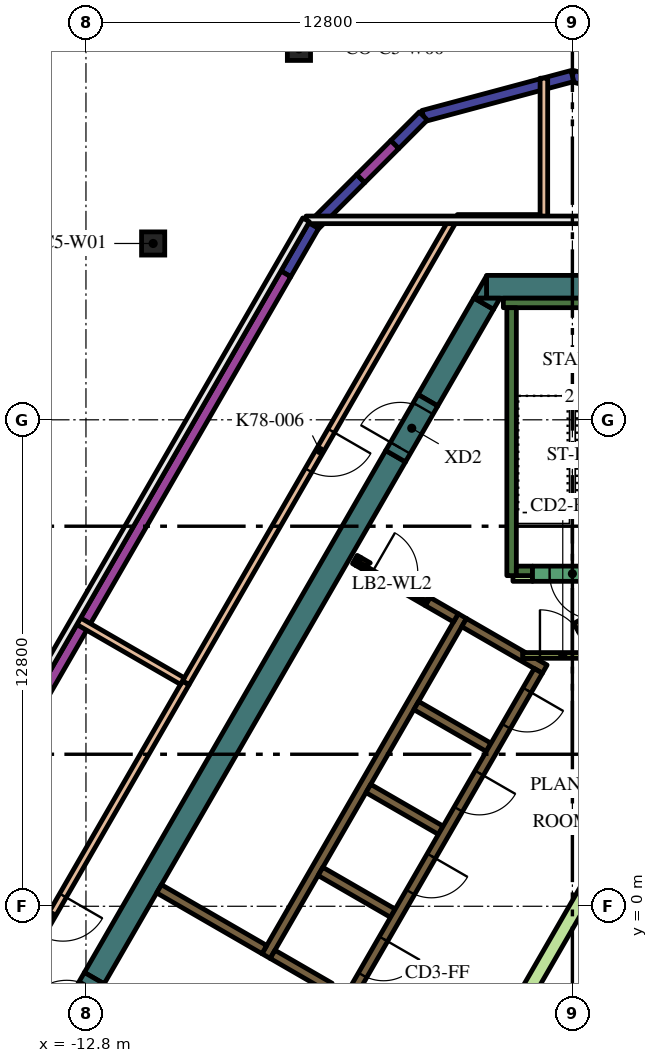
"""IFC4 building model, lengths in metres.
Left out: names, types, materials, properties, quantities, classifications, styles, units other than length and angle.
Written with IfcOpenShell. Run it as: python <this file> out.ifc"""

import sys

from ifc_helpers import new_model, si_unit, direction, frame, frame_2d, origin, origin_2d, place, context, subcontext, project, spatial, polyline, rectangle, hollow_circle, outline, extrude, element, fill, save


model = new_model("IFC4")
c1 = context("Model", 3, precision=1e-05, world=origin(), true_north=direction((0.0, 1.0)))
c2 = subcontext(c1, "Body", "Model", "MODEL_VIEW")
j1 = project(units=[si_unit("LENGTHUNIT", "METRE"), si_unit("PLANEANGLEUNIT", "RADIAN")], contexts=[c1])
p1 = place(None, origin())
s1 = spatial("IfcSite", under=j1, at=p1, CompositionType="ELEMENT")
p2 = place(p1, origin())
s2 = spatial("IfcBuilding", under=s1, at=p2, CompositionType="ELEMENT")
p3 = place(p2, frame((0.0, 0.0, 336.0)))
s3 = spatial("IfcBuildingStorey", under=s2, at=p3, CompositionType="ELEMENT", Elevation=336.0)
for number, where, z_axis, x_axis in (
    (1, (-7.195, 22.561, 0.0), (0.0, 0.0, 1.0), (1.0, 0.0, 0.0)),
    (2, (-11.032, 17.44, 0.0), (0.0, 0.0, 1.0), (1.0, 0.0, 0.0)),
):
    element("IfcColumn", number, at=place(p3, frame(where, z_axis=z_axis, x_axis=x_axis)), inside=s3, PredefinedType="COLUMN", context=c2, shape_type="SweptSolid", body=[
        extrude(hollow_circle(Radius=0.305, WallThickness=0.025, at=origin_2d()), origin(), (0.0, 0.0, 1.0), 4.2),
    ])
p4 = place(p3, frame((-2.258, 16.3, 0.0), z_axis=(0.0, 0.0, 1.0), x_axis=(1.0, 0.0, 0.0)))
e3 = element("IfcWall", 3, at=p4, inside=s3, PredefinedType="SOLIDWALL", context=c2, shape_type="SweptSolid", body=[
    extrude(rectangle(XDim=3.823, YDim=0.6, at=frame_2d((1.912, 0.0))), origin(), (0.0, 0.0, 1.0), 4.2),
])
p5 = place(p3, origin())
e4 = element("IfcWall", 4, at=p5, inside=s3, PredefinedType="SOLIDWALL", context=c2, shape_type="SweptSolid", body=[
    extrude(outline(polyline([(-2.598, 16.0), (-2.26, 16.585), (-2.26, 16.0), (-2.598, 16.0)])), origin(), (0.0, 0.0, 1.0), 4.2),
])
p6 = place(p3, frame((-2.335, 15.855, 0.0), z_axis=(0.0, 0.0, 1.0), x_axis=(-0.499960127962, -0.866048422692, 0.0)))
e5 = element("IfcWall", 5, at=p6, inside=s3, PredefinedType="SOLIDWALL", context=c2, shape_type="SweptSolid", body=[
    extrude(rectangle(XDim=2.934, YDim=0.6, at=frame_2d((1.467, 0.0))), origin(), (0.0, 0.0, 1.0), 4.2),
])
e6 = element("IfcWall", 6, at=p5, inside=s3, PredefinedType="SOLIDWALL", context=c2, shape_type="SweptSolid", body=[
    extrude(outline(polyline([(-1.905, 16.0), (-2.074, 15.707), (-2.581, 16.0), (-1.905, 16.0)])), origin(), (0.0, 0.0, 1.0), 4.2),
])
p7 = place(p3, frame((-4.652, 11.842, 0.0), z_axis=(0.0, 0.0, 1.0), x_axis=(-0.500003640647, -0.866023301845, 0.0)))
e7 = element("IfcWall", 7, at=p7, inside=s3, PredefinedType="SOLIDWALL", context=c2, shape_type="SweptSolid", body=[
    extrude(rectangle(XDim=15.858, YDim=0.6, at=frame_2d((7.929, 0.0))), origin(), (0.0, 0.0, 1.0), 4.2),
])
p8 = place(p3, frame((-1.817, 15.875, 0.0), z_axis=(0.0, 0.0, 1.0), x_axis=(1.0, 0.0, 0.0)))
e8 = element("IfcWall", 8, at=p8, inside=s3, PredefinedType="SOLIDWALL", context=c2, shape_type="SweptSolid", body=[
    extrude(rectangle(XDim=3.634, YDim=0.25, at=frame_2d((1.817, 0.0))), origin(), (0.0, 0.0, 1.0), 4.2),
])
p9 = place(p3, frame((-1.6, 8.7, 0.0), z_axis=(0.0, 0.0, 1.0), x_axis=(0.0, 1.0, 0.0)))
e9 = element("IfcWall", 9, at=p9, inside=s3, PredefinedType="SOLIDWALL", context=c2, shape_type="SweptSolid", body=[
    extrude(rectangle(XDim=7.05, YDim=0.25, at=frame_2d((3.525, 0.0))), origin(), (0.0, 0.0, 1.0), 4.2),
])
p10 = place(p3, frame((-1.475, 8.825, 0.0), z_axis=(0.0, 0.0, 1.0), x_axis=(1.0, 0.0, 0.0)))
e10 = element("IfcWall", 10, at=p10, inside=s3, PredefinedType="SOLIDWALL", context=c2, shape_type="SweptSolid", body=[
    extrude(rectangle(XDim=0.425, YDim=0.25, at=frame_2d((0.212, 0.0))), origin(), (0.0, 0.0, 1.0), 4.2),
])
p11 = place(p3, frame((3.647, 9.38, 0.0), z_axis=(0.0, 0.0, 1.0), x_axis=(-0.866027868628, -0.499995730742, 0.0)))
e11 = element("IfcWall", 11, at=p11, inside=s3, PredefinedType="SOLIDWALL", context=c2, shape_type="SweptSolid", body=[
    extrude(rectangle(XDim=4.099, YDim=0.25, at=frame_2d((2.049, 0.0))), origin(), (0.0, 0.0, 1.0), 4.2),
])
p12 = place(p3, frame((-8.06, -1.311, 0.0), z_axis=(0.0, 0.0, 1.0), x_axis=(0.50000273126, 0.866023826885, 0.0)))
e12 = element("IfcWall", 12, at=p12, inside=s3, PredefinedType="SOLIDWALL", context=c2, shape_type="SweptSolid", body=[
    extrude(rectangle(XDim=10.33, YDim=0.25, at=frame_2d((5.165, 0.0))), origin(), (0.0, 0.0, 1.0), 4.2),
])
e13 = element("IfcWall", 13, at=p5, inside=s3, PredefinedType="SOLIDWALL", context=c2, shape_type="SweptSolid", body=[
    extrude(outline(polyline([(-2.912, 7.356), (-2.787, 7.573), (-1.232, 6.675), (-1.303, 6.675), (-1.304, 6.675), (-1.304, 6.675), (-1.304, 6.525), (-1.304, 6.525), (-1.303, 6.525), (-0.971, 6.525), (-0.665, 6.348), (-0.79, 6.132), (-1.007, 6.257), (-1.007, 6.257), (-2.912, 7.356)])), origin(), (0.0, 0.0, 1.0), 4.2),
])
for number, where, z_axis, x_axis in (
    (14, (-2.204, 4.182, 0.0), (0.0, 0.0, 1.0), (-0.866, 0.5, 0.0)),
    (15, (-5.369, 3.1, 0.0), (0.0, 0.0, 1.0), (0.866, -0.5, 0.0)),
    (16, (-4.724, -0.182, 0.0), (0.0, 0.0, 1.0), (-0.866, 0.5, 0.0)),
):
    element("IfcWall", number, at=place(p3, frame(where, z_axis=z_axis, x_axis=x_axis)), inside=s3, PredefinedType="SOLIDWALL", context=c2, shape_type="SweptSolid", body=[
        extrude(rectangle(XDim=2.2, YDim=0.25, at=frame_2d((1.1, 0.0))), origin(), (0.0, 0.0, 1.0), 4.2),
    ])
p13 = place(p3, frame((-7.889, -1.265, 0.0), z_axis=(0.0, 0.0, 1.0), x_axis=(0.865986741702, -0.500066958712, 0.0)))
e17 = element("IfcWall", 17, at=p13, inside=s3, PredefinedType="SOLIDWALL", context=c2, shape_type="SweptSolid", body=[
    extrude(rectangle(XDim=1.738, YDim=0.25, at=frame_2d((0.869, 0.0))), origin(), (0.0, 0.0, 1.0), 4.2),
])
p14 = place(p3, frame((-8.106, -1.14, 0.0), z_axis=(0.0, 0.0, 1.0), x_axis=(-0.866008981251, 0.500028443584, 0.0)))
e18 = element("IfcWall", 18, at=p14, inside=s3, PredefinedType="SOLIDWALL", context=c2, shape_type="SweptSolid", body=[
    extrude(rectangle(XDim=3.2, YDim=0.25, at=frame_2d((1.6, 0.0))), origin(), (0.0, 0.0, 1.0), 4.2),
])
p15 = place(p3, frame((-5.725, 9.125, 0.0), z_axis=(0.0, 0.0, 1.0), x_axis=(0.866185586049, -0.49972245349, 0.0)))
e19 = element("IfcWall", 19, at=p15, inside=s3, PredefinedType="SOLIDWALL", context=c2, shape_type="SweptSolid", body=[
    extrude(rectangle(XDim=0.11, YDim=0.25, at=frame_2d((0.055, 0.0))), origin(), (0.0, 0.0, 1.0), 4.2),
])
p16 = place(p3, frame((-3.066, 7.59, 0.0), z_axis=(0.0, 0.0, 1.0), x_axis=(-0.866081358704, 0.49990307071, 0.0)))
e20 = element("IfcWall", 20, at=p16, inside=s3, PredefinedType="SOLIDWALL", context=c2, shape_type="SweptSolid", body=[
    extrude(rectangle(XDim=0.858, YDim=0.25, at=frame_2d((0.429, 0.0))), origin(), (0.0, 0.0, 1.0), 4.2),
])
e21 = element("IfcWall", 21, at=p5, inside=s3, PredefinedType="SOLIDWALL", context=c2, shape_type="SweptSolid", body=[
    extrude(outline(polyline([(-3.748, 8.128), (-3.813, 8.015), (-4.027, 8.139), (-4.017, 8.156), (-4.008, 8.173), (-4.0, 8.192), (-3.995, 8.21), (-3.991, 8.23), (-3.99, 8.25), (-3.99, 8.268), (-3.748, 8.128)])), origin(), (0.0, 0.0, 1.0), 4.2),
])
e22 = element("IfcWall", 22, at=p5, inside=s3, PredefinedType="SOLIDWALL", context=c2, shape_type="SweptSolid", body=[
    extrude(outline(polyline([(-5.689, 8.96), (-5.69, 8.961), (-5.565, 9.177), (-5.319, 9.035), (-5.335, 9.026), (-5.351, 9.015), (-5.366, 9.002), (-5.379, 8.988), (-5.392, 8.972), (-5.402, 8.956), (-5.412, 8.939), (-5.629, 9.064), (-5.629, 9.064), (-5.689, 8.96)])), origin(), (0.0, 0.0, 1.0), 4.2),
])
p17 = place(p3, frame((-1.564, 8.625, 0.0), z_axis=(0.0, 0.0, 1.0), x_axis=(1.0, 0.0, 0.0)))
e23 = element("IfcWall", 23, at=p17, inside=s3, PredefinedType="PARTITIONING", context=c2, shape_type="SweptSolid", body=[
    extrude(rectangle(XDim=0.514, YDim=0.15, at=frame_2d((0.257, 0.0))), origin(), (0.0, 0.0, 1.0), 3.45),
])
e24 = element("IfcWall", 24, at=p5, inside=s3, PredefinedType="PARTITIONING", context=c2, shape_type="SweptSolid", body=[
    extrude(outline(polyline([(2.017, 3.643), (2.342, 3.456), (-1.822, -3.756), (-2.147, -3.568), (2.017, 3.643)])), origin(), (0.0, 0.0, 1.0), 3.45),
])
p18 = place(p3, frame((-0.898, 6.194, 0.0), z_axis=(0.0, 0.0, 1.0), x_axis=(-0.499996202215, -0.866027596426, 0.0)))
e25 = element("IfcWall", 25, at=p18, inside=s3, PredefinedType="SOLIDWALL", context=c2, shape_type="SweptSolid", body=[
    extrude(rectangle(XDim=9.83, YDim=0.25, at=frame_2d((4.915, 0.0))), origin(), (0.0, 0.0, 1.0), 4.2),
])
p19 = place(p18, frame((0.585, 0.0, 0.0)))
e26 = element("IfcOpeningElement", 26, at=p19, cuts=e25, PredefinedType="OPENING", context=c2, shape_type="SweptSolid", body=[
    extrude(rectangle(XDim=1.1, YDim=2.1, at=frame_2d((0.55, 1.05))), frame((0.0, 0.135, 0.0), z_axis=(0.0, -1.0, 0.0), x_axis=(1.0, 0.0, 0.0)), (0.0, 0.0, 1.0), 0.27),
])
p20 = place(p18, frame((3.105, 0.0, 0.0)))
e27 = element("IfcOpeningElement", 27, at=p20, cuts=e25, PredefinedType="OPENING", context=c2, shape_type="SweptSolid", body=[
    extrude(rectangle(XDim=1.1, YDim=2.1, at=frame_2d((0.55, 1.05))), frame((0.0, 0.135, 0.0), z_axis=(0.0, -1.0, 0.0), x_axis=(1.0, 0.0, 0.0)), (0.0, 0.0, 1.0), 0.27),
])
p21 = place(p18, frame((5.625, 0.0, 0.0)))
e28 = element("IfcOpeningElement", 28, at=p21, cuts=e25, PredefinedType="OPENING", context=c2, shape_type="SweptSolid", body=[
    extrude(rectangle(XDim=1.1, YDim=2.1, at=frame_2d((0.55, 1.05))), frame((0.0, 0.135, 0.0), z_axis=(0.0, -1.0, 0.0), x_axis=(1.0, 0.0, 0.0)), (0.0, 0.0, 1.0), 0.27),
])
p22 = place(p18, frame((8.145, 0.0, 0.0)))
e29 = element("IfcOpeningElement", 29, at=p22, cuts=e25, PredefinedType="OPENING", context=c2, shape_type="SweptSolid", body=[
    extrude(rectangle(XDim=1.1, YDim=2.1, at=frame_2d((0.55, 1.05))), frame((0.0, 0.135, 0.0), z_axis=(0.0, -1.0, 0.0), x_axis=(1.0, 0.0, 0.0)), (0.0, 0.0, 1.0), 0.27),
])
p23 = place(p3, frame((1.05, 8.75, 0.0), z_axis=(0.0, 0.0, 1.0), x_axis=(-1.0, 0.0, 0.0)))
e30 = element("IfcWall", 30, at=p23, inside=s3, PredefinedType="SOLIDWALL", context=c2, shape_type="SweptSolid", body=[
    extrude(rectangle(XDim=2.1, YDim=0.4, at=frame_2d((1.05, 0.0))), origin(), (0.0, 0.0, 1.0), 4.2),
])
p24 = place(p23, frame((0.45, 0.0, 0.0)))
e31 = element("IfcOpeningElement", 31, at=p24, cuts=e30, PredefinedType="OPENING", context=c2, shape_type="SweptSolid", body=[
    extrude(rectangle(XDim=1.2, YDim=2.1, at=frame_2d((0.6, 1.05))), frame((0.0, 0.21, 0.0), z_axis=(0.0, -1.0, 0.0), x_axis=(1.0, 0.0, 0.0)), (0.0, 0.0, 1.0), 0.42),
])
p25 = place(p3, frame((-1.303, 6.6, 0.0), z_axis=(0.0, 0.0, 1.0), x_axis=(1.0, 0.0, 0.0)))
e32 = element("IfcWall", 32, at=p25, inside=s3, PredefinedType="PARTITIONING", context=c2, shape_type="SweptSolid", body=[
    extrude(rectangle(XDim=2.1, YDim=0.15, at=frame_2d((1.05, 0.0))), origin(), (0.0, 0.0, 1.0), 4.2),
])
p26 = place(p25, frame((0.45, 0.0, 0.0)))
e33 = element("IfcOpeningElement", 33, at=p26, cuts=e32, PredefinedType="OPENING", context=c2, shape_type="SweptSolid", body=[
    extrude(rectangle(XDim=1.2, YDim=2.1, at=frame_2d((0.6, 1.05))), frame((0.0, 0.085, 0.0), z_axis=(0.0, -1.0, 0.0), x_axis=(1.0, 0.0, 0.0)), (0.0, 0.0, 1.0), 0.17),
])
p27 = place(p3, frame((-5.659, 9.012, 0.0), z_axis=(0.0, 0.0, 1.0), x_axis=(0.866009402589, -0.500027713859, 0.0)))
e34 = element("IfcWall", 34, at=p27, inside=s3, PredefinedType="PARTITIONING", context=c2, shape_type="SweptSolid", body=[
    extrude(rectangle(XDim=2.1, YDim=0.12, at=frame_2d((1.05, 0.0))), origin(), (0.0, 0.0, 1.0), 3.45),
])
p28 = place(p27, frame((0.45, 0.0, 0.0)))
e35 = element("IfcOpeningElement", 35, at=p28, cuts=e34, PredefinedType="OPENING", context=c2, shape_type="SweptSolid", body=[
    extrude(rectangle(XDim=1.2, YDim=2.1, at=frame_2d((0.6, 1.05))), frame((0.0, 0.07, 0.0), z_axis=(0.0, -1.0, 0.0), x_axis=(1.0, 0.0, 0.0)), (0.0, 0.0, 1.0), 0.14),
])
p29 = place(p3, frame((-4.652, 11.842, 0.0), z_axis=(0.0, 0.0, 1.0), x_axis=(0.500062241894, 0.865989465428, 0.0)))
e36 = element("IfcWall", 36, at=p29, inside=s3, PredefinedType="SOLIDWALL", context=c2, shape_type="SweptSolid", body=[
    extrude(rectangle(XDim=1.7, YDim=0.6, at=frame_2d((0.85, 0.0))), origin(), (0.0, 0.0, 1.0), 4.2),
])
p30 = place(p29, frame((0.25, 0.0, 0.0)))
e37 = element("IfcOpeningElement", 37, at=p30, cuts=e36, PredefinedType="OPENING", context=c2, shape_type="SweptSolid", body=[
    extrude(rectangle(XDim=1.2, YDim=2.1, at=frame_2d((0.6, 1.05))), frame((0.0, 0.31, 0.0), z_axis=(0.0, -1.0, 0.0), x_axis=(1.0, 0.0, 0.0)), (0.0, 0.0, 1.0), 0.62),
])
p31 = place(p3, frame((-13.432, -3.364, 0.0), z_axis=(0.0, 0.0, 1.0), x_axis=(0.500000056704, 0.866025371046, 0.0)))
e38 = element("IfcWall", 38, at=p31, inside=s3, PredefinedType="SOLIDWALL", context=c2, shape_type="SweptSolid", body=[
    extrude(rectangle(XDim=1.7, YDim=0.6, at=frame_2d((0.85, 0.0))), origin(), (0.0, 0.0, 1.0), 4.2),
])
p32 = place(p31, frame((0.25, 0.0, 0.0)))
e39 = element("IfcOpeningElement", 39, at=p32, cuts=e38, PredefinedType="OPENING", context=c2, shape_type="SweptSolid", body=[
    extrude(rectangle(XDim=1.2, YDim=2.1, at=frame_2d((0.6, 1.05))), frame((0.0, 0.31, 0.0), z_axis=(0.0, -1.0, 0.0), x_axis=(1.0, 0.0, 0.0)), (0.0, 0.0, 1.0), 0.62),
])
p33 = place(p3, frame((-10.176, 5.875, 0.0), z_axis=(0.0, 0.0, 1.0), x_axis=(-0.499989432091, -0.866031505083, 0.0)))
e40 = element("IfcWall", 40, at=p33, inside=s3, PredefinedType="PARTITIONING", context=c2, shape_type="SweptSolid", body=[
    extrude(rectangle(XDim=14.116, YDim=0.2, at=frame_2d((7.058, 0.0))), origin(), (0.0, 0.0, 1.0), 3.45),
])
p34 = place(p33, frame((6.458, 0.0, 0.0)))
e41 = element("IfcOpeningElement", 41, at=p34, cuts=e40, PredefinedType="OPENING", context=c2, shape_type="SweptSolid", body=[
    extrude(rectangle(XDim=1.2, YDim=2.1, at=frame_2d((0.6, 1.05))), frame((0.0, 0.11, 0.0), z_axis=(0.0, -1.0, 0.0), x_axis=(1.0, 0.0, 0.0)), (0.0, 0.0, 1.0), 0.22),
])
p35 = place(p3, frame((-3.118, 18.1, 0.0), z_axis=(0.0, 0.0, 1.0), x_axis=(-0.499999609035, -0.866025629508, 0.0)))
e42 = element("IfcWall", 42, at=p35, inside=s3, PredefinedType="PARTITIONING", context=c2, shape_type="SweptSolid", body=[
    extrude(rectangle(XDim=14.106, YDim=0.2, at=frame_2d((7.053, 0.0))), origin(), (0.0, 0.0, 1.0), 3.45),
])
p36 = place(p35, frame((6.453, 0.0, 0.0)))
e43 = element("IfcOpeningElement", 43, at=p36, cuts=e42, PredefinedType="OPENING", context=c2, shape_type="SweptSolid", body=[
    extrude(rectangle(XDim=1.2, YDim=2.1, at=frame_2d((0.6, 1.05))), frame((0.0, 0.11, 0.0), z_axis=(0.0, -1.0, 0.0), x_axis=(1.0, 0.0, 0.0)), (0.0, 0.0, 1.0), 0.22),
])
p37 = place(p3, frame((-0.75, 18.1, 0.0), z_axis=(0.0, 0.0, 1.0), x_axis=(0.0, 1.0, 0.0)))
e44 = element("IfcWall", 44, at=p37, inside=s3, PredefinedType="PARTITIONING", context=c2, shape_type="SweptSolid", body=[
    extrude(rectangle(XDim=3.688, YDim=0.2, at=frame_2d((1.844, 0.0))), origin(), (0.0, 0.0, 1.0), 3.45),
])
p38 = place(p3, frame((-12.99, 7.5, 0.0), z_axis=(0.0, 0.0, 1.0), x_axis=(0.866035871367, -0.499981869177, 0.0)))
e45 = element("IfcWall", 45, at=p38, inside=s3, PredefinedType="PARTITIONING", context=c2, shape_type="SweptSolid", body=[
    extrude(rectangle(XDim=3.15, YDim=0.2, at=frame_2d((1.575, 0.0))), origin(), (0.0, 0.0, 1.0), 3.45),
])
p39 = place(p3, frame((-3.028, 18.1, 0.0), z_axis=(0.0, 0.0, 1.0), x_axis=(1.0, 0.0, 0.0)))
e46 = element("IfcWall", 46, at=p39, inside=s3, PredefinedType="PARTITIONING", context=c2, shape_type="SweptSolid", body=[
    extrude(rectangle(XDim=2.177, YDim=0.2, at=frame_2d((1.089, 0.0))), origin(), (0.0, 0.0, 1.0), 3.45),
])
for number, where, z_axis, x_axis in (
    (47, (3.922, 20.794, 0.0), (0.0, 0.0, 1.0), (-0.966, 0.259, 0.0)),
    (48, (0.0, 21.845, 0.0), (0.0, 0.0, 1.0), (-0.966, -0.259, 0.0)),
):
    element("IfcWall", number, at=place(p3, frame(where, z_axis=z_axis, x_axis=x_axis)), inside=s3, PredefinedType="SOLIDWALL", context=c2, shape_type="SweptSolid", body=[
        extrude(rectangle(XDim=4.061, YDim=0.3, at=frame_2d((2.03, 0.0))), origin(), (0.0, 0.0, 1.0), 3.95),
    ])
p40 = place(p3, frame((-3.922, 20.794, 0.0), z_axis=(0.0, 0.0, 1.0), x_axis=(-0.707106781187, -0.707106781187, 0.0)))
e49 = element("IfcWall", 49, at=p40, inside=s3, PredefinedType="SOLIDWALL", context=c2, shape_type="SweptSolid", body=[
    extrude(rectangle(XDim=1.065, YDim=0.3, at=frame_2d((0.532, 0.0))), origin(), (0.0, 0.0, 1.0), 3.95),
])
p41 = place(p3, frame((-4.675, 20.041, 0.0), z_axis=(0.0, 0.0, 1.0), x_axis=(-0.707106781187, -0.707106781187, 0.0)))
e50 = element("IfcWall", 50, at=p41, inside=s3, PredefinedType="SOLIDWALL", context=c2, shape_type="SweptSolid", body=[
    extrude(rectangle(XDim=1.264, YDim=0.3, at=frame_2d((0.632, 0.0))), origin(), (0.0, 0.0, 1.0), 3.45),
])
p42 = place(p3, frame((-5.569, 19.147, 0.0), z_axis=(0.0, 0.0, 1.0), x_axis=(-0.707106781187, -0.707106781187, 0.0)))
e51 = element("IfcWall", 51, at=p42, inside=s3, PredefinedType="SOLIDWALL", context=c2, shape_type="SweptSolid", body=[
    extrude(rectangle(XDim=1.752, YDim=0.3, at=frame_2d((0.876, 0.0))), origin(), (0.0, 0.0, 1.0), 3.95),
])
p43 = place(p3, frame((-6.808, 17.908, 0.0), z_axis=(0.0, 0.0, 1.0), x_axis=(-0.499977492351, -0.866038398192, 0.0)))
e52 = element("IfcWall", 52, at=p43, inside=s3, PredefinedType="SOLIDWALL", context=c2, shape_type="SweptSolid", body=[
    extrude(rectangle(XDim=1.464, YDim=0.3, at=frame_2d((0.732, 0.0))), origin(), (0.0, 0.0, 1.0), 3.95),
])
p44 = place(p3, frame((-7.54, 16.64, 0.0), z_axis=(0.0, 0.0, 1.0), x_axis=(-0.500002158106, -0.866024157798, 0.0)))
e53 = element("IfcWall", 53, at=p44, inside=s3, PredefinedType="SOLIDWALL", context=c2, shape_type="SweptSolid", body=[
    extrude(rectangle(XDim=21.282, YDim=0.3, at=frame_2d((10.641, 0.0))), origin(), (0.0, 0.0, 1.0), 3.45),
])
p45 = place(p19, origin())
e54 = element("IfcDoor", 54, at=p45, inside=s3, OperationType="DOUBLE_DOOR_SLIDING", PredefinedType="DOOR", context=c2, shape_type="SweptSolid", body=[
    extrude(rectangle(XDim=1.1, YDim=2.1, at=frame_2d((0.55, 1.05))), frame((0.0, 0.025, 0.0), z_axis=(0.0, -1.0, 0.0), x_axis=(1.0, 0.0, 0.0)), (0.0, 0.0, 1.0), 0.05),
])
fill(e26, e54)
p46 = place(p20, origin())
e55 = element("IfcDoor", 55, at=p46, inside=s3, OperationType="DOUBLE_DOOR_SLIDING", PredefinedType="DOOR", context=c2, shape_type="SweptSolid", body=[
    extrude(rectangle(XDim=1.1, YDim=2.1, at=frame_2d((0.55, 1.05))), frame((0.0, 0.025, 0.0), z_axis=(0.0, -1.0, 0.0), x_axis=(1.0, 0.0, 0.0)), (0.0, 0.0, 1.0), 0.05),
])
fill(e27, e55)
p47 = place(p21, origin())
e56 = element("IfcDoor", 56, at=p47, inside=s3, OperationType="DOUBLE_DOOR_SLIDING", PredefinedType="DOOR", context=c2, shape_type="SweptSolid", body=[
    extrude(rectangle(XDim=1.1, YDim=2.1, at=frame_2d((0.55, 1.05))), frame((0.0, 0.025, 0.0), z_axis=(0.0, -1.0, 0.0), x_axis=(1.0, 0.0, 0.0)), (0.0, 0.0, 1.0), 0.05),
])
fill(e28, e56)
p48 = place(p22, origin())
e57 = element("IfcDoor", 57, at=p48, inside=s3, OperationType="DOUBLE_DOOR_SLIDING", PredefinedType="DOOR", context=c2, shape_type="SweptSolid", body=[
    extrude(rectangle(XDim=1.1, YDim=2.1, at=frame_2d((0.55, 1.05))), frame((0.0, 0.025, 0.0), z_axis=(0.0, -1.0, 0.0), x_axis=(1.0, 0.0, 0.0)), (0.0, 0.0, 1.0), 0.05),
])
fill(e29, e57)
p49 = place(p24, origin())
e58 = element("IfcDoor", 58, at=p49, inside=s3, OperationType="SINGLE_SWING_LEFT", PredefinedType="DOOR", context=c2, shape_type="SweptSolid", body=[
    extrude(rectangle(XDim=1.2, YDim=2.1, at=frame_2d((0.6, 1.05))), frame((0.0, 0.025, 0.0), z_axis=(0.0, -1.0, 0.0), x_axis=(1.0, 0.0, 0.0)), (0.0, 0.0, 1.0), 0.05),
])
fill(e31, e58)
p50 = place(p26, origin())
e59 = element("IfcDoor", 59, at=p50, inside=s3, OperationType="SINGLE_SWING_LEFT", PredefinedType="DOOR", context=c2, shape_type="SweptSolid", body=[
    extrude(rectangle(XDim=1.2, YDim=2.1, at=frame_2d((0.6, 1.05))), frame((0.0, 0.025, 0.0), z_axis=(0.0, -1.0, 0.0), x_axis=(1.0, 0.0, 0.0)), (0.0, 0.0, 1.0), 0.05),
])
fill(e33, e59)
p51 = place(p28, origin())
e60 = element("IfcDoor", 60, at=p51, inside=s3, OperationType="SINGLE_SWING_LEFT", PredefinedType="DOOR", context=c2, shape_type="SweptSolid", body=[
    extrude(rectangle(XDim=1.2, YDim=2.1, at=frame_2d((0.6, 1.05))), frame((0.0, 0.025, 0.0), z_axis=(0.0, -1.0, 0.0), x_axis=(1.0, 0.0, 0.0)), (0.0, 0.0, 1.0), 0.05),
])
fill(e35, e60)
p52 = place(p30, origin())
e61 = element("IfcDoor", 61, at=p52, inside=s3, OperationType="SINGLE_SWING_LEFT", PredefinedType="DOOR", context=c2, shape_type="SweptSolid", body=[
    extrude(rectangle(XDim=1.2, YDim=2.1, at=frame_2d((0.6, 1.05))), frame((0.0, 0.025, 0.0), z_axis=(0.0, -1.0, 0.0), x_axis=(1.0, 0.0, 0.0)), (0.0, 0.0, 1.0), 0.05),
])
fill(e37, e61)
p53 = place(p34, origin())
e62 = element("IfcDoor", 62, at=p53, inside=s3, OperationType="SINGLE_SWING_RIGHT", PredefinedType="DOOR", context=c2, shape_type="SweptSolid", body=[
    extrude(rectangle(XDim=1.2, YDim=2.1, at=frame_2d((0.6, 1.05))), frame((0.0, 0.025, 0.0), z_axis=(0.0, -1.0, 0.0), x_axis=(1.0, 0.0, 0.0)), (0.0, 0.0, 1.0), 0.05),
])
fill(e41, e62)
p54 = place(p36, origin())
e63 = element("IfcDoor", 63, at=p54, inside=s3, OperationType="SINGLE_SWING_RIGHT", PredefinedType="DOOR", context=c2, shape_type="SweptSolid", body=[
    extrude(rectangle(XDim=1.2, YDim=2.1, at=frame_2d((0.6, 1.05))), frame((0.0, 0.025, 0.0), z_axis=(0.0, -1.0, 0.0), x_axis=(1.0, 0.0, 0.0)), (0.0, 0.0, 1.0), 0.05),
])
fill(e43, e63)
save(model, sys.argv[1])
